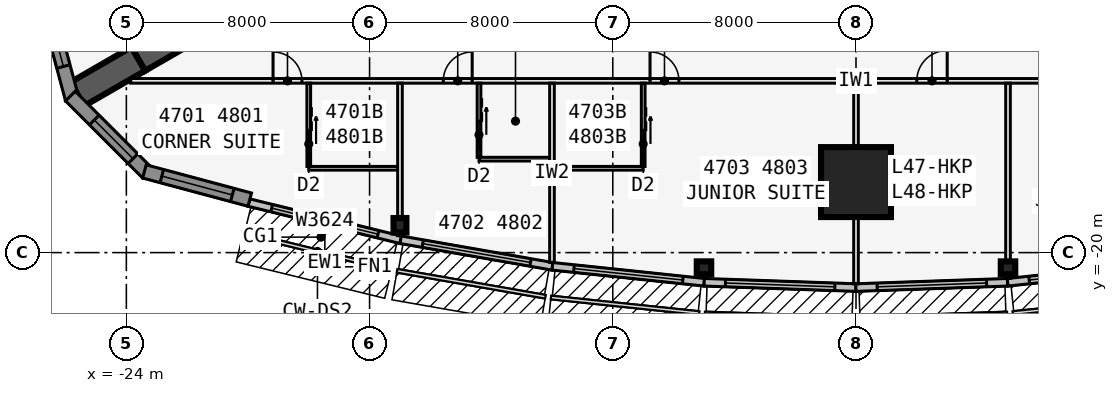
"""IFC4 building model, lengths in metres.
Left out: names, types, materials, properties, quantities, classifications, styles, units other than length and angle.
Written with IfcOpenShell. Run it as: python <this file> out.ifc"""

import sys

from ifc_helpers import new_model, si_unit, direction, frame, frame_2d, origin, origin_2d, place, context, subcontext, project, spatial, polyline, rectangle, i_section, outline, extrude, element, fill, save


model = new_model("IFC4")
c1 = context("Model", 3, precision=1e-05, world=origin(), true_north=direction((0.0, 1.0)))
c2 = subcontext(c1, "Body", "Model", "MODEL_VIEW")
j1 = project(units=[si_unit("LENGTHUNIT", "METRE"), si_unit("PLANEANGLEUNIT", "RADIAN")], contexts=[c1])
p1 = place(None, origin())
s1 = spatial("IfcSite", under=j1, at=p1, CompositionType="ELEMENT")
p2 = place(p1, origin())
s2 = spatial("IfcBuilding", under=s1, at=p2, CompositionType="ELEMENT")
p3 = place(p2, frame((0.0, 0.0, 175.9)))
s3 = spatial("IfcBuildingStorey", under=s2, at=p3, CompositionType="ELEMENT", Elevation=175.9)
for number, where, z_axis, x_axis in (
    (1, (-21.61, -12.477, 0.0), (0.0, 0.0, 1.0), (-0.866, -0.5, 0.0)),
    (2, (-23.61, -13.631, 0.0), (0.0, 0.0, 1.0), (-0.866, -0.5, 0.0)),
):
    element("IfcWall", number, at=place(p3, frame(where, z_axis=z_axis, x_axis=x_axis)), inside=s3, PredefinedType="SHEAR", context=c2, shape_type="SweptSolid", body=[
        extrude(rectangle(XDim=2.309, YDim=0.9, at=frame_2d((1.155, 0.0))), origin(), (0.0, 0.0, 1.0), 3.4),
    ])
for number, where, z_axis, x_axis in (
    (3, (-15.0, -19.1, 0.0), (0.0, 0.0, 1.0), (1.0, 0.0, 0.0)),
    (4, (-5.0, -20.5, 0.0), (0.0, 0.0, 1.0), (0.0, -1.0, 0.0)),
    (5, (5.0, -20.5, 0.0), (0.0, 0.0, 1.0), (0.0, -1.0, 0.0)),
):
    element("IfcColumn", number, at=place(p3, frame(where, z_axis=z_axis, x_axis=x_axis)), inside=s3, PredefinedType="COLUMN", context=c2, shape_type="SweptSolid", body=[
        extrude(i_section(OverallWidth=0.424, OverallDepth=0.475, WebThickness=0.048, FlangeThickness=0.077, at=origin_2d()), origin(), (0.0, 0.0, 1.0), 3.4),
    ])
p4 = place(p3, frame((0.0, -17.68, 0.0), z_axis=(0.0, 0.0, 1.0), x_axis=(0.0, -1.0, 0.0)))
e6 = element("IfcColumn", 6, at=p4, inside=s3, PredefinedType="COLUMN", context=c2, shape_type="SweptSolid", body=[
    extrude(rectangle(XDim=2.3, YDim=2.3, at=origin_2d()), origin(), (0.0, 0.0, 1.0), 3.4),
])
p5 = place(p3, frame((-19.97, -18.354, 0.0), z_axis=(0.0, 0.0, 1.0), x_axis=(0.971270024053, -0.237980126011, 0.0)))
e7 = element("IfcWall", 7, at=p5, inside=s3, PredefinedType="STANDARD", context=c2, shape_type="SweptSolid", body=[
    extrude(rectangle(XDim=5.148, YDim=0.25, at=frame_2d((2.574, 0.0))), origin(), (0.0, 0.0, 1.0), 3.235),
])
p6 = place(p5, frame((0.774, 0.0, 0.45)))
e8 = element("IfcOpeningElement", 8, at=p6, cuts=e7, PredefinedType="OPENING", context=c2, shape_type="SweptSolid", body=[
    extrude(rectangle(XDim=3.6, YDim=2.4, at=frame_2d((1.8, 1.2))), frame((0.0, 0.135, 0.0), z_axis=(0.0, -1.0, 0.0), x_axis=(1.0, 0.0, 0.0)), (0.0, 0.0, 1.0), 0.27),
])
p7 = place(p3, frame((-14.979, -19.577, 0.0), z_axis=(0.0, 0.0, 1.0), x_axis=(0.985030467156, -0.172380331752, 0.0)))
e9 = element("IfcWall", 9, at=p7, inside=s3, PredefinedType="STANDARD", context=c2, shape_type="SweptSolid", body=[
    extrude(rectangle(XDim=5.076, YDim=0.25, at=frame_2d((2.538, 0.0))), origin(), (0.0, 0.0, 1.0), 3.235),
])
p8 = place(p7, frame((0.738, 0.0, 0.45)))
e10 = element("IfcOpeningElement", 10, at=p8, cuts=e9, PredefinedType="OPENING", context=c2, shape_type="SweptSolid", body=[
    extrude(rectangle(XDim=3.6, YDim=2.4, at=frame_2d((1.8, 1.2))), frame((0.0, 0.135, 0.0), z_axis=(0.0, -1.0, 0.0), x_axis=(1.0, 0.0, 0.0)), (0.0, 0.0, 1.0), 0.27),
])
p9 = place(p3, frame((-9.987, -20.451, 0.0), z_axis=(0.0, 0.0, 1.0), x_axis=(0.994534683851, -0.104406717299, 0.0)))
e11 = element("IfcWall", 11, at=p9, inside=s3, PredefinedType="STANDARD", context=c2, shape_type="SweptSolid", body=[
    extrude(rectangle(XDim=5.028, YDim=0.25, at=frame_2d((2.514, 0.0))), origin(), (0.0, 0.0, 1.0), 3.235),
])
p10 = place(p9, frame((0.714, 0.0, 0.45)))
e12 = element("IfcOpeningElement", 12, at=p10, cuts=e11, PredefinedType="OPENING", context=c2, shape_type="SweptSolid", body=[
    extrude(rectangle(XDim=3.6, YDim=2.4, at=frame_2d((1.8, 1.2))), frame((0.0, 0.135, 0.0), z_axis=(0.0, -1.0, 0.0), x_axis=(1.0, 0.0, 0.0)), (0.0, 0.0, 1.0), 0.27),
])
p11 = place(p3, frame((-4.996, -20.975, 0.0), z_axis=(0.0, 0.0, 1.0), x_axis=(0.999387720943, -0.034988329879, 0.0)))
e13 = element("IfcWall", 13, at=p11, inside=s3, PredefinedType="STANDARD", context=c2, shape_type="SweptSolid", body=[
    extrude(rectangle(XDim=5.003, YDim=0.25, at=frame_2d((2.501, 0.0))), origin(), (0.0, 0.0, 1.0), 3.235),
])
p12 = place(p11, frame((0.701, 0.0, 0.45)))
e14 = element("IfcOpeningElement", 14, at=p12, cuts=e13, PredefinedType="OPENING", context=c2, shape_type="SweptSolid", body=[
    extrude(rectangle(XDim=3.6, YDim=2.4, at=frame_2d((1.8, 1.2))), frame((0.0, 0.135, 0.0), z_axis=(0.0, -1.0, 0.0), x_axis=(1.0, 0.0, 0.0)), (0.0, 0.0, 1.0), 0.27),
])
p13 = place(p3, frame((-0.004, -21.15, 0.0), z_axis=(0.0, 0.0, 1.0), x_axis=(0.999387720943, 0.034988329879, 0.0)))
e15 = element("IfcWall", 15, at=p13, inside=s3, PredefinedType="STANDARD", context=c2, shape_type="SweptSolid", body=[
    extrude(rectangle(XDim=5.003, YDim=0.25, at=frame_2d((2.501, 0.0))), origin(), (0.0, 0.0, 1.0), 3.235),
])
p14 = place(p13, frame((0.701, 0.0, 0.45)))
e16 = element("IfcOpeningElement", 16, at=p14, cuts=e15, PredefinedType="OPENING", context=c2, shape_type="SweptSolid", body=[
    extrude(rectangle(XDim=3.6, YDim=2.4, at=frame_2d((1.8, 1.2))), frame((0.0, 0.135, 0.0), z_axis=(0.0, -1.0, 0.0), x_axis=(1.0, 0.0, 0.0)), (0.0, 0.0, 1.0), 0.27),
])
p15 = place(p3, frame((4.987, -20.976, 0.0), z_axis=(0.0, 0.0, 1.0), x_axis=(0.994534683851, 0.104406717299, 0.0)))
e17 = element("IfcWall", 17, at=p15, inside=s3, PredefinedType="STANDARD", context=c2, shape_type="SweptSolid", body=[
    extrude(rectangle(XDim=5.028, YDim=0.25, at=frame_2d((2.514, 0.0))), origin(), (0.0, 0.0, 1.0), 3.235),
])
p16 = place(p15, frame((0.714, 0.0, 0.45)))
e18 = element("IfcOpeningElement", 18, at=p16, cuts=e17, PredefinedType="OPENING", context=c2, shape_type="SweptSolid", body=[
    extrude(rectangle(XDim=3.6, YDim=2.4, at=frame_2d((1.8, 1.2))), frame((0.0, 0.135, 0.0), z_axis=(0.0, -1.0, 0.0), x_axis=(1.0, 0.0, 0.0)), (0.0, 0.0, 1.0), 0.27),
])
p17 = place(p3, frame((-26.711, -11.489, 0.0), z_axis=(0.0, 0.0, 1.0), x_axis=(0.258823421857, -0.965924653531, 0.0)))
e19 = element("IfcWall", 19, at=p17, inside=s3, PredefinedType="SOLIDWALL", context=c2, shape_type="SweptSolid", body=[
    extrude(outline(polyline([(3.586, 0.225), (3.527, 0.225), (3.035, 0.093), (3.0, 0.225), (0.0, 0.225), (0.0, -0.225), (3.586, -0.225), (3.586, 0.225)])), origin(), (0.0, 0.0, 1.0), 3.235),
])
p18 = place(p17, frame((0.675, 0.0, 0.45)))
e20 = element("IfcOpeningElement", 20, at=p18, cuts=e19, PredefinedType="OPENING", context=c2, shape_type="SweptSolid", body=[
    extrude(rectangle(XDim=1.8, YDim=2.4, at=frame_2d((0.9, 1.2))), frame((0.0, 0.235, 0.0), z_axis=(0.0, -1.0, 0.0), x_axis=(1.0, 0.0, 0.0)), (0.0, 0.0, 1.0), 0.47),
])
p19 = place(p3, frame((-25.841, -14.852, 0.0), z_axis=(0.0, 0.0, 1.0), x_axis=(0.707106781187, -0.707106781187, 0.0)))
e21 = element("IfcWall", 21, at=p19, inside=s3, PredefinedType="SOLIDWALL", context=c2, shape_type="SweptSolid", body=[
    extrude(outline(polyline([(3.586, 0.225), (0.586, 0.225), (0.551, 0.093), (0.059, 0.225), (0.0, 0.225), (0.0, -0.225), (3.586, -0.225), (3.586, 0.225)])), origin(), (0.0, 0.0, 1.0), 3.235),
])
p20 = place(p19, frame((1.111, 0.0, 0.45)))
e22 = element("IfcOpeningElement", 22, at=p20, cuts=e21, PredefinedType="OPENING", context=c2, shape_type="SweptSolid", body=[
    extrude(rectangle(XDim=1.8, YDim=2.4, at=frame_2d((0.9, 1.2))), frame((0.0, 0.235, 0.0), z_axis=(0.0, -1.0, 0.0), x_axis=(1.0, 0.0, 0.0)), (0.0, 0.0, 1.0), 0.47),
])
p21 = place(p3, frame((-23.406, -17.33, 0.0), z_axis=(0.0, 0.0, 1.0), x_axis=(0.965924653531, -0.258823421857, 0.0)))
e23 = element("IfcWall", 23, at=p21, inside=s3, PredefinedType="SOLIDWALL", context=c2, shape_type="SweptSolid", body=[
    extrude(rectangle(XDim=3.586, YDim=0.45, at=frame_2d((1.793, 0.0))), origin(), (0.0, 0.0, 1.0), 3.235),
])
p22 = place(p21, frame((0.593, 0.0, 0.45)))
e24 = element("IfcOpeningElement", 24, at=p22, cuts=e23, PredefinedType="OPENING", context=c2, shape_type="SweptSolid", body=[
    extrude(rectangle(XDim=2.4, YDim=2.4, at=frame_2d((1.2, 1.2))), frame((0.0, 0.235, 0.0), z_axis=(0.0, -1.0, 0.0), x_axis=(1.0, 0.0, 0.0)), (0.0, 0.0, 1.0), 0.47),
])
p23 = place(p3, frame((-23.857, -14.351, 0.0), z_axis=(0.0, 0.0, 1.0), x_axis=(1.0, 0.0, 0.0)))
e25 = element("IfcWall", 25, at=p23, inside=s3, PredefinedType="PARTITIONING", context=c2, shape_type="SweptSolid", body=[
    extrude(rectangle(XDim=47.714, YDim=0.15, at=frame_2d((23.857, 0.0))), origin(), (0.0, 0.0, 1.0), 3.235),
])
p24 = place(p23, frame((4.682, 0.0, 0.0)))
e26 = element("IfcOpeningElement", 26, at=p24, cuts=e25, PredefinedType="OPENING", context=c2, shape_type="SweptSolid", body=[
    extrude(rectangle(XDim=0.95, YDim=2.13, at=frame_2d((0.475, 1.065))), frame((0.0, 0.085, 0.0), z_axis=(0.0, -1.0, 0.0), x_axis=(1.0, 0.0, 0.0)), (0.0, 0.0, 1.0), 0.17),
])
p25 = place(p23, frame((10.282, 0.0, 0.0)))
e27 = element("IfcOpeningElement", 27, at=p25, cuts=e25, PredefinedType="OPENING", context=c2, shape_type="SweptSolid", body=[
    extrude(rectangle(XDim=0.95, YDim=2.13, at=frame_2d((0.475, 1.065))), frame((0.0, 0.085, 0.0), z_axis=(0.0, -1.0, 0.0), x_axis=(1.0, 0.0, 0.0)), (0.0, 0.0, 1.0), 0.17),
])
p26 = place(p23, frame((17.082, 0.0, 0.0)))
e28 = element("IfcOpeningElement", 28, at=p26, cuts=e25, PredefinedType="OPENING", context=c2, shape_type="SweptSolid", body=[
    extrude(rectangle(XDim=0.95, YDim=2.13, at=frame_2d((0.475, 1.065))), frame((0.0, 0.085, 0.0), z_axis=(0.0, -1.0, 0.0), x_axis=(1.0, 0.0, 0.0)), (0.0, 0.0, 1.0), 0.17),
])
p27 = place(p23, frame((25.857, 0.0, 0.0)))
e29 = element("IfcOpeningElement", 29, at=p27, cuts=e25, PredefinedType="OPENING", context=c2, shape_type="SweptSolid", body=[
    extrude(rectangle(XDim=1.0, YDim=2.13, at=frame_2d((0.5, 1.065))), frame((0.0, 0.085, 0.0), z_axis=(0.0, -1.0, 0.0), x_axis=(1.0, 0.0, 0.0)), (0.0, 0.0, 1.0), 0.17),
])
p28 = place(p23, frame((34.682, 0.0, 0.0)))
e30 = element("IfcOpeningElement", 30, at=p28, cuts=e25, PredefinedType="OPENING", context=c2, shape_type="SweptSolid", body=[
    extrude(rectangle(XDim=0.95, YDim=2.13, at=frame_2d((0.475, 1.065))), frame((0.0, 0.085, 0.0), z_axis=(0.0, -1.0, 0.0), x_axis=(1.0, 0.0, 0.0)), (0.0, 0.0, 1.0), 0.17),
])
p29 = place(p23, frame((42.082, 0.0, 0.0)))
e31 = element("IfcOpeningElement", 31, at=p29, cuts=e25, PredefinedType="OPENING", context=c2, shape_type="SweptSolid", body=[
    extrude(rectangle(XDim=0.95, YDim=2.13, at=frame_2d((0.475, 1.065))), frame((0.0, 0.085, 0.0), z_axis=(0.0, -1.0, 0.0), x_axis=(1.0, 0.0, 0.0)), (0.0, 0.0, 1.0), 0.17),
])
p30 = place(p3, frame((-15.0, -14.426, 0.0), z_axis=(0.0, 0.0, 1.0), x_axis=(0.0, -1.0, 0.0)))
e32 = element("IfcWall", 32, at=p30, inside=s3, PredefinedType="PARTITIONING", context=c2, shape_type="SweptSolid", body=[
    extrude(rectangle(XDim=5.017, YDim=0.15, at=frame_2d((2.508, 0.0))), origin(), (0.0, 0.0, 1.0), 2.389),
])
p31 = place(p3, frame((-10.0, -14.426, 0.0), z_axis=(0.0, 0.0, 1.0), x_axis=(0.0, -1.0, 0.0)))
e33 = element("IfcWall", 33, at=p31, inside=s3, PredefinedType="PARTITIONING", context=c2, shape_type="SweptSolid", body=[
    extrude(rectangle(XDim=5.895, YDim=0.15, at=frame_2d((2.948, 0.0))), origin(), (0.0, 0.0, 1.0), 2.389),
])
p32 = place(p3, frame((0.0, -14.426, 0.0), z_axis=(0.0, 0.0, 1.0), x_axis=(0.0, -1.0, 0.0)))
e34 = element("IfcWall", 34, at=p32, inside=s3, PredefinedType="PARTITIONING", context=c2, shape_type="SweptSolid", body=[
    extrude(rectangle(XDim=6.599, YDim=0.15, at=frame_2d((3.299, 0.0))), origin(), (0.0, 0.0, 1.0), 2.389),
])
p33 = place(p3, frame((5.0, -14.426, 0.0), z_axis=(0.0, 0.0, 1.0), x_axis=(0.0, -1.0, 0.0)))
e35 = element("IfcWall", 35, at=p33, inside=s3, PredefinedType="PARTITIONING", context=c2, shape_type="SweptSolid", body=[
    extrude(rectangle(XDim=6.423, YDim=0.15, at=frame_2d((3.211, 0.0))), origin(), (0.0, 0.0, 1.0), 2.389),
])
p34 = place(p3, frame((-18.0, -17.226, 0.0), z_axis=(0.0, 0.0, 1.0), x_axis=(1.0, 0.0, 0.0)))
e36 = element("IfcWall", 36, at=p34, inside=s3, PredefinedType="PLUMBINGWALL", context=c2, shape_type="SweptSolid", body=[
    extrude(rectangle(XDim=3.0, YDim=0.12, at=frame_2d((1.5, 0.0))), origin(), (0.0, 0.0, 1.0), 3.235),
])
p35 = place(p3, frame((-18.0, -14.426, 0.0), z_axis=(0.0, 0.0, 1.0), x_axis=(0.0, -1.0, 0.0)))
e37 = element("IfcWall", 37, at=p35, inside=s3, PredefinedType="PLUMBINGWALL", context=c2, shape_type="SweptSolid", body=[
    extrude(rectangle(XDim=2.74, YDim=0.12, at=frame_2d((1.37, 0.0))), origin(), (0.0, 0.0, 1.0), 3.235),
])
p36 = place(p35, frame((1.55, 0.0, 0.0)))
e38 = element("IfcOpeningElement", 38, at=p36, cuts=e37, PredefinedType="OPENING", context=c2, shape_type="SweptSolid", body=[
    extrude(rectangle(XDim=0.9, YDim=2.13, at=frame_2d((0.45, 1.065))), frame((0.0, 0.07, 0.0), z_axis=(0.0, -1.0, 0.0), x_axis=(1.0, 0.0, 0.0)), (0.0, 0.0, 1.0), 0.14),
])
p37 = place(p3, frame((-12.4, -16.926, 0.0), z_axis=(0.0, 0.0, 1.0), x_axis=(1.0, 0.0, 0.0)))
e39 = element("IfcWall", 39, at=p37, inside=s3, PredefinedType="PLUMBINGWALL", context=c2, shape_type="SweptSolid", body=[
    extrude(rectangle(XDim=2.4, YDim=0.12, at=frame_2d((1.2, 0.0))), origin(), (0.0, 0.0, 1.0), 3.235),
])
p38 = place(p3, frame((-12.4, -14.426, 0.0), z_axis=(0.0, 0.0, 1.0), x_axis=(0.0, -1.0, 0.0)))
e40 = element("IfcWall", 40, at=p38, inside=s3, PredefinedType="PLUMBINGWALL", context=c2, shape_type="SweptSolid", body=[
    extrude(rectangle(XDim=2.44, YDim=0.12, at=frame_2d((1.22, 0.0))), origin(), (0.0, 0.0, 1.0), 3.235),
])
p39 = place(p38, frame((1.25, 0.0, 0.0)))
e41 = element("IfcOpeningElement", 41, at=p39, cuts=e40, PredefinedType="OPENING", context=c2, shape_type="SweptSolid", body=[
    extrude(rectangle(XDim=0.9, YDim=2.13, at=frame_2d((0.45, 1.065))), frame((0.0, 0.07, 0.0), z_axis=(0.0, -1.0, 0.0), x_axis=(1.0, 0.0, 0.0)), (0.0, 0.0, 1.0), 0.14),
])
p40 = place(p3, frame((-10.0, -17.226, 0.0), z_axis=(0.0, 0.0, 1.0), x_axis=(1.0, 0.0, 0.0)))
e42 = element("IfcWall", 42, at=p40, inside=s3, PredefinedType="PLUMBINGWALL", context=c2, shape_type="SweptSolid", body=[
    extrude(rectangle(XDim=3.0, YDim=0.12, at=frame_2d((1.5, 0.0))), origin(), (0.0, 0.0, 1.0), 3.235),
])
p41 = place(p3, frame((-7.0, -14.426, 0.0), z_axis=(0.0, 0.0, 1.0), x_axis=(0.0, -1.0, 0.0)))
e43 = element("IfcWall", 43, at=p41, inside=s3, PredefinedType="PLUMBINGWALL", context=c2, shape_type="SweptSolid", body=[
    extrude(rectangle(XDim=2.74, YDim=0.12, at=frame_2d((1.37, 0.0))), origin(), (0.0, 0.0, 1.0), 3.235),
])
p42 = place(p41, frame((1.55, 0.0, 0.0)))
e44 = element("IfcOpeningElement", 44, at=p42, cuts=e43, PredefinedType="OPENING", context=c2, shape_type="SweptSolid", body=[
    extrude(rectangle(XDim=0.9, YDim=2.13, at=frame_2d((0.45, 1.065))), frame((0.0, 0.07, 0.0), z_axis=(0.0, -1.0, 0.0), x_axis=(1.0, 0.0, 0.0)), (0.0, 0.0, 1.0), 0.14),
])
p43 = place(p6, origin())
e45 = element("IfcWindow", 45, at=p43, inside=s3, PartitioningType="SINGLE_PANEL", PredefinedType="WINDOW", context=c2, shape_type="SweptSolid", body=[
    extrude(rectangle(XDim=3.6, YDim=2.4, at=frame_2d((1.8, 1.2))), frame((0.0, 0.03, 0.0), z_axis=(0.0, -1.0, 0.0), x_axis=(1.0, 0.0, 0.0)), (0.0, 0.0, 1.0), 0.06),
])
fill(e8, e45)
p44 = place(p8, origin())
e46 = element("IfcWindow", 46, at=p44, inside=s3, PartitioningType="SINGLE_PANEL", PredefinedType="WINDOW", context=c2, shape_type="SweptSolid", body=[
    extrude(rectangle(XDim=3.6, YDim=2.4, at=frame_2d((1.8, 1.2))), frame((0.0, 0.03, 0.0), z_axis=(0.0, -1.0, 0.0), x_axis=(1.0, 0.0, 0.0)), (0.0, 0.0, 1.0), 0.06),
])
fill(e10, e46)
p45 = place(p10, origin())
e47 = element("IfcWindow", 47, at=p45, inside=s3, PartitioningType="SINGLE_PANEL", PredefinedType="WINDOW", context=c2, shape_type="SweptSolid", body=[
    extrude(rectangle(XDim=3.6, YDim=2.4, at=frame_2d((1.8, 1.2))), frame((0.0, 0.03, 0.0), z_axis=(0.0, -1.0, 0.0), x_axis=(1.0, 0.0, 0.0)), (0.0, 0.0, 1.0), 0.06),
])
fill(e12, e47)
p46 = place(p12, origin())
e48 = element("IfcWindow", 48, at=p46, inside=s3, PartitioningType="SINGLE_PANEL", PredefinedType="WINDOW", context=c2, shape_type="SweptSolid", body=[
    extrude(rectangle(XDim=3.6, YDim=2.4, at=frame_2d((1.8, 1.2))), frame((0.0, 0.03, 0.0), z_axis=(0.0, -1.0, 0.0), x_axis=(1.0, 0.0, 0.0)), (0.0, 0.0, 1.0), 0.06),
])
fill(e14, e48)
p47 = place(p14, origin())
e49 = element("IfcWindow", 49, at=p47, inside=s3, PartitioningType="SINGLE_PANEL", PredefinedType="WINDOW", context=c2, shape_type="SweptSolid", body=[
    extrude(rectangle(XDim=3.6, YDim=2.4, at=frame_2d((1.8, 1.2))), frame((0.0, 0.03, 0.0), z_axis=(0.0, -1.0, 0.0), x_axis=(1.0, 0.0, 0.0)), (0.0, 0.0, 1.0), 0.06),
])
fill(e16, e49)
p48 = place(p16, origin())
e50 = element("IfcWindow", 50, at=p48, inside=s3, PartitioningType="SINGLE_PANEL", PredefinedType="WINDOW", context=c2, shape_type="SweptSolid", body=[
    extrude(rectangle(XDim=3.6, YDim=2.4, at=frame_2d((1.8, 1.2))), frame((0.0, 0.03, 0.0), z_axis=(0.0, -1.0, 0.0), x_axis=(1.0, 0.0, 0.0)), (0.0, 0.0, 1.0), 0.06),
])
fill(e18, e50)
p49 = place(p18, origin())
e51 = element("IfcWindow", 51, at=p49, inside=s3, PartitioningType="SINGLE_PANEL", PredefinedType="WINDOW", context=c2, shape_type="SweptSolid", body=[
    extrude(rectangle(XDim=1.8, YDim=2.4, at=frame_2d((0.9, 1.2))), frame((0.0, 0.03, 0.0), z_axis=(0.0, -1.0, 0.0), x_axis=(1.0, 0.0, 0.0)), (0.0, 0.0, 1.0), 0.06),
])
fill(e20, e51)
p50 = place(p20, origin())
e52 = element("IfcWindow", 52, at=p50, inside=s3, PartitioningType="SINGLE_PANEL", PredefinedType="WINDOW", context=c2, shape_type="SweptSolid", body=[
    extrude(rectangle(XDim=1.8, YDim=2.4, at=frame_2d((0.9, 1.2))), frame((0.0, 0.03, 0.0), z_axis=(0.0, -1.0, 0.0), x_axis=(1.0, 0.0, 0.0)), (0.0, 0.0, 1.0), 0.06),
])
fill(e22, e52)
p51 = place(p22, origin())
e53 = element("IfcWindow", 53, at=p51, inside=s3, PartitioningType="SINGLE_PANEL", PredefinedType="WINDOW", context=c2, shape_type="SweptSolid", body=[
    extrude(rectangle(XDim=2.4, YDim=2.4, at=frame_2d((1.2, 1.2))), frame((0.0, 0.03, 0.0), z_axis=(0.0, -1.0, 0.0), x_axis=(1.0, 0.0, 0.0)), (0.0, 0.0, 1.0), 0.06),
])
fill(e24, e53)
p52 = place(p36, origin())
e54 = element("IfcDoor", 54, at=p52, inside=s3, OperationType="SLIDING_TO_LEFT", PredefinedType="DOOR", context=c2, shape_type="SweptSolid", body=[
    extrude(rectangle(XDim=0.9, YDim=2.13, at=frame_2d((0.45, 1.065))), frame((0.0, 0.025, 0.0), z_axis=(0.0, -1.0, 0.0), x_axis=(1.0, 0.0, 0.0)), (0.0, 0.0, 1.0), 0.05),
])
fill(e38, e54)
p53 = place(p24, origin())
e55 = element("IfcDoor", 55, at=p53, inside=s3, OperationType="SINGLE_SWING_LEFT", PredefinedType="DOOR", context=c2, shape_type="SweptSolid", body=[
    extrude(rectangle(XDim=0.95, YDim=2.13, at=frame_2d((0.475, 1.065))), frame((0.0, 0.025, 0.0), z_axis=(0.0, -1.0, 0.0), x_axis=(1.0, 0.0, 0.0)), (0.0, 0.0, 1.0), 0.05),
])
fill(e26, e55)
p54 = place(p39, origin())
e56 = element("IfcDoor", 56, at=p54, inside=s3, OperationType="SLIDING_TO_LEFT", PredefinedType="DOOR", context=c2, shape_type="SweptSolid", body=[
    extrude(rectangle(XDim=0.9, YDim=2.13, at=frame_2d((0.45, 1.065))), frame((0.0, 0.025, 0.0), z_axis=(0.0, -1.0, 0.0), x_axis=(1.0, 0.0, 0.0)), (0.0, 0.0, 1.0), 0.05),
])
fill(e41, e56)
p55 = place(p25, origin())
e57 = element("IfcDoor", 57, at=p55, inside=s3, OperationType="SINGLE_SWING_RIGHT", PredefinedType="DOOR", context=c2, shape_type="SweptSolid", body=[
    extrude(rectangle(XDim=0.95, YDim=2.13, at=frame_2d((0.475, 1.065))), frame((0.0, 0.025, 0.0), z_axis=(0.0, -1.0, 0.0), x_axis=(1.0, 0.0, 0.0)), (0.0, 0.0, 1.0), 0.05),
])
fill(e27, e57)
p56 = place(p42, origin())
e58 = element("IfcDoor", 58, at=p56, inside=s3, OperationType="SLIDING_TO_LEFT", PredefinedType="DOOR", context=c2, shape_type="SweptSolid", body=[
    extrude(rectangle(XDim=0.9, YDim=2.13, at=frame_2d((0.45, 1.065))), frame((0.0, 0.025, 0.0), z_axis=(0.0, -1.0, 0.0), x_axis=(1.0, 0.0, 0.0)), (0.0, 0.0, 1.0), 0.05),
])
fill(e44, e58)
p57 = place(p26, origin())
e59 = element("IfcDoor", 59, at=p57, inside=s3, OperationType="SINGLE_SWING_LEFT", PredefinedType="DOOR", context=c2, shape_type="SweptSolid", body=[
    extrude(rectangle(XDim=0.95, YDim=2.13, at=frame_2d((0.475, 1.065))), frame((0.0, 0.025, 0.0), z_axis=(0.0, -1.0, 0.0), x_axis=(1.0, 0.0, 0.0)), (0.0, 0.0, 1.0), 0.05),
])
fill(e28, e59)
p58 = place(p27, origin())
e60 = element("IfcDoor", 60, at=p58, inside=s3, OperationType="SINGLE_SWING_RIGHT", PredefinedType="DOOR", context=c2, shape_type="SweptSolid", body=[
    extrude(rectangle(XDim=1.0, YDim=2.13, at=frame_2d((0.5, 1.065))), frame((0.0, 0.025, 0.0), z_axis=(0.0, -1.0, 0.0), x_axis=(1.0, 0.0, 0.0)), (0.0, 0.0, 1.0), 0.05),
])
fill(e29, e60)
save(model, sys.argv[1])
